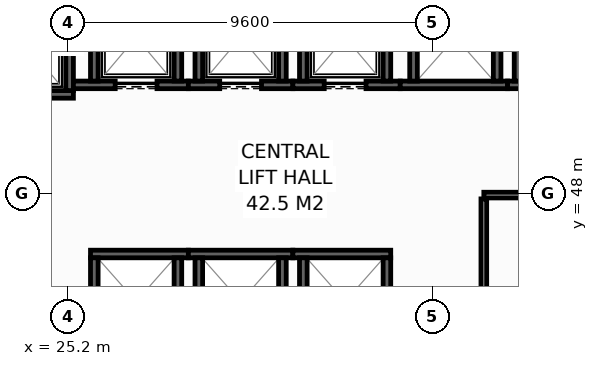
"""IFC4 building model, lengths in metres.
Left out: names, types, materials, properties, quantities, classifications, styles, units other than length and angle.
Written with IfcOpenShell. Run it as: python <this file> out.ifc"""

import sys

from ifc_helpers import new_model, si_unit, direction, frame, frame_2d, origin, place, context, subcontext, project, spatial, rectangle, extrude, element, fill, save


model = new_model("IFC4")
c1 = context("Model", 3, precision=1e-05, world=origin(), true_north=direction((0.0, 1.0)))
c2 = subcontext(c1, "Body", "Model", "MODEL_VIEW")
j1 = project(units=[si_unit("LENGTHUNIT", "METRE"), si_unit("PLANEANGLEUNIT", "RADIAN")], contexts=[c1])
p1 = place(None, origin())
s1 = spatial("IfcSite", under=j1, at=p1, CompositionType="ELEMENT")
p2 = place(p1, origin())
s2 = spatial("IfcBuilding", under=s1, at=p2, CompositionType="ELEMENT")
p3 = place(p2, frame((0.0, 0.0, 27.6)))
s3 = spatial("IfcBuildingStorey", under=s2, at=p3, CompositionType="ELEMENT", Elevation=27.6)
p4 = place(p3, frame((22.5, 50.6, 0.0), z_axis=(0.0, 0.0, 1.0), x_axis=(1.0, 0.0, 0.0)))
e1 = element("IfcWall", 1, at=p4, inside=s3, PredefinedType="SHEAR", context=c2, shape_type="SweptSolid", body=[
    extrude(rectangle(XDim=2.85, YDim=0.2, at=frame_2d((1.425, 0.0))), origin(), (0.0, 0.0, 1.0), 5.15),
])
p5 = place(p4, frame((0.925, 0.0, 0.0)))
e2 = element("IfcOpeningElement", 2, at=p5, cuts=e1, PredefinedType="OPENING", context=c2, shape_type="SweptSolid", body=[
    extrude(rectangle(XDim=1.25, YDim=2.3, at=frame_2d((0.625, 1.15))), frame((0.0, 0.11, 0.0), z_axis=(0.0, -1.0, 0.0), x_axis=(1.0, 0.0, 0.0)), (0.0, 0.0, 1.0), 0.22),
])
p6 = place(p3, frame((25.25, 50.7, 0.0), z_axis=(0.0, 0.0, 1.0), x_axis=(0.0, 1.0, 0.0)))
e3 = element("IfcWall", 3, at=p6, inside=s3, PredefinedType="SHEAR", context=c2, shape_type="SweptSolid", body=[
    extrude(rectangle(XDim=2.6, YDim=0.2, at=frame_2d((1.3, 0.0))), origin(), (0.0, 0.0, 1.0), 5.15),
])
p7 = place(p3, frame((25.35, 50.85, 0.0), z_axis=(0.0, 0.0, 1.0), x_axis=(1.0, 0.0, 0.0)))
e4 = element("IfcWall", 4, at=p7, inside=s3, PredefinedType="SHEAR", context=c2, shape_type="SweptSolid", body=[
    extrude(rectangle(XDim=3.025, YDim=0.2, at=frame_2d((1.512, 0.0))), origin(), (0.0, 0.0, 1.0), 5.15),
])
p8 = place(p7, frame((1.1, 0.0, 0.0)))
e5 = element("IfcOpeningElement", 5, at=p8, cuts=e4, PredefinedType="OPENING", context=c2, shape_type="SweptSolid", body=[
    extrude(rectangle(XDim=1.1, YDim=2.2, at=frame_2d((0.55, 1.1))), frame((0.0, 0.11, 0.0), z_axis=(0.0, -1.0, 0.0), x_axis=(1.0, 0.0, 0.0)), (0.0, 0.0, 1.0), 0.22),
])
for number, where, z_axis, x_axis in (
    (6, (25.9, 50.95, 0.0), (0.0, 0.0, 1.0), (0.0, 1.0, 0.0)),
    (7, (28.1, 50.95, 0.0), (0.0, 0.0, 1.0), (0.0, 1.0, 0.0)),
):
    element("IfcWall", number, at=place(p3, frame(where, z_axis=z_axis, x_axis=x_axis)), inside=s3, PredefinedType="SHEAR", context=c2, shape_type="SweptSolid", body=[
        extrude(rectangle(XDim=2.3, YDim=0.2, at=frame_2d((1.15, 0.0))), origin(), (0.0, 0.0, 1.0), 5.15),
    ])
p9 = place(p3, frame((28.375, 50.85, 0.0), z_axis=(0.0, 0.0, 1.0), x_axis=(1.0, 0.0, 0.0)))
e8 = element("IfcWall", 8, at=p9, inside=s3, PredefinedType="SHEAR", context=c2, shape_type="SweptSolid", body=[
    extrude(rectangle(XDim=2.75, YDim=0.2, at=frame_2d((1.375, 0.0))), origin(), (0.0, 0.0, 1.0), 5.15),
])
p10 = place(p9, frame((0.825, 0.0, 0.0)))
e9 = element("IfcOpeningElement", 9, at=p10, cuts=e8, PredefinedType="OPENING", context=c2, shape_type="SweptSolid", body=[
    extrude(rectangle(XDim=1.1, YDim=2.2, at=frame_2d((0.55, 1.1))), frame((0.0, 0.11, 0.0), z_axis=(0.0, -1.0, 0.0), x_axis=(1.0, 0.0, 0.0)), (0.0, 0.0, 1.0), 0.22),
])
for number, where, z_axis, x_axis in (
    (10, (28.65, 50.95, 0.0), (0.0, 0.0, 1.0), (0.0, 1.0, 0.0)),
    (11, (30.85, 50.95, 0.0), (0.0, 0.0, 1.0), (0.0, 1.0, 0.0)),
):
    element("IfcWall", number, at=place(p3, frame(where, z_axis=z_axis, x_axis=x_axis)), inside=s3, PredefinedType="SHEAR", context=c2, shape_type="SweptSolid", body=[
        extrude(rectangle(XDim=2.3, YDim=0.2, at=frame_2d((1.15, 0.0))), origin(), (0.0, 0.0, 1.0), 5.15),
    ])
p11 = place(p3, frame((31.125, 50.85, 0.0), z_axis=(0.0, 0.0, 1.0), x_axis=(1.0, 0.0, 0.0)))
e12 = element("IfcWall", 12, at=p11, inside=s3, PredefinedType="SHEAR", context=c2, shape_type="SweptSolid", body=[
    extrude(rectangle(XDim=2.825, YDim=0.2, at=frame_2d((1.413, 0.0))), origin(), (0.0, 0.0, 1.0), 5.15),
])
p12 = place(p11, frame((0.825, 0.0, 0.0)))
e13 = element("IfcOpeningElement", 13, at=p12, cuts=e12, PredefinedType="OPENING", context=c2, shape_type="SweptSolid", body=[
    extrude(rectangle(XDim=1.1, YDim=2.2, at=frame_2d((0.55, 1.1))), frame((0.0, 0.11, 0.0), z_axis=(0.0, -1.0, 0.0), x_axis=(1.0, 0.0, 0.0)), (0.0, 0.0, 1.0), 0.22),
])
for number, where, z_axis, x_axis in (
    (14, (31.4, 50.95, 0.0), (0.0, 0.0, 1.0), (0.0, 1.0, 0.0)),
    (15, (33.6, 50.95, 0.0), (0.0, 0.0, 1.0), (0.0, 1.0, 0.0)),
):
    element("IfcWall", number, at=place(p3, frame(where, z_axis=z_axis, x_axis=x_axis)), inside=s3, PredefinedType="SHEAR", context=c2, shape_type="SweptSolid", body=[
        extrude(rectangle(XDim=2.3, YDim=0.2, at=frame_2d((1.15, 0.0))), origin(), (0.0, 0.0, 1.0), 5.15),
    ])
p13 = place(p3, frame((25.8, 46.4, 0.0), z_axis=(0.0, 0.0, 1.0), x_axis=(1.0, 0.0, 0.0)))
e16 = element("IfcWall", 16, at=p13, inside=s3, PredefinedType="SHEAR", context=c2, shape_type="SweptSolid", body=[
    extrude(rectangle(XDim=2.575, YDim=0.2, at=frame_2d((1.288, 0.0))), origin(), (0.0, 0.0, 1.0), 5.15),
])
for number, where, z_axis, x_axis in (
    (17, (25.9, 44.0, 0.0), (0.0, 0.0, 1.0), (0.0, 1.0, 0.0)),
    (18, (28.1, 44.0, 0.0), (0.0, 0.0, 1.0), (0.0, 1.0, 0.0)),
):
    element("IfcWall", number, at=place(p3, frame(where, z_axis=z_axis, x_axis=x_axis)), inside=s3, PredefinedType="SHEAR", context=c2, shape_type="SweptSolid", body=[
        extrude(rectangle(XDim=2.3, YDim=0.2, at=frame_2d((1.15, 0.0))), origin(), (0.0, 0.0, 1.0), 5.15),
    ])
p14 = place(p3, frame((28.375, 46.4, 0.0), z_axis=(0.0, 0.0, 1.0), x_axis=(1.0, 0.0, 0.0)))
e19 = element("IfcWall", 19, at=p14, inside=s3, PredefinedType="SHEAR", context=c2, shape_type="SweptSolid", body=[
    extrude(rectangle(XDim=2.75, YDim=0.2, at=frame_2d((1.375, 0.0))), origin(), (0.0, 0.0, 1.0), 5.15),
])
for number, where, z_axis, x_axis in (
    (20, (28.65, 44.0, 0.0), (0.0, 0.0, 1.0), (0.0, 1.0, 0.0)),
    (21, (30.85, 44.0, 0.0), (0.0, 0.0, 1.0), (0.0, 1.0, 0.0)),
):
    element("IfcWall", number, at=place(p3, frame(where, z_axis=z_axis, x_axis=x_axis)), inside=s3, PredefinedType="SHEAR", context=c2, shape_type="SweptSolid", body=[
        extrude(rectangle(XDim=2.3, YDim=0.2, at=frame_2d((1.15, 0.0))), origin(), (0.0, 0.0, 1.0), 5.15),
    ])
p15 = place(p3, frame((31.125, 46.4, 0.0), z_axis=(0.0, 0.0, 1.0), x_axis=(1.0, 0.0, 0.0)))
e22 = element("IfcWall", 22, at=p15, inside=s3, PredefinedType="SHEAR", context=c2, shape_type="SweptSolid", body=[
    extrude(rectangle(XDim=2.575, YDim=0.2, at=frame_2d((1.288, 0.0))), origin(), (0.0, 0.0, 1.0), 5.15),
])
for number, where, z_axis, x_axis in (
    (23, (31.4, 44.0, 0.0), (0.0, 0.0, 1.0), (0.0, 1.0, 0.0)),
    (24, (33.6, 44.0, 0.0), (0.0, 0.0, 1.0), (0.0, 1.0, 0.0)),
):
    element("IfcWall", number, at=place(p3, frame(where, z_axis=z_axis, x_axis=x_axis)), inside=s3, PredefinedType="SHEAR", context=c2, shape_type="SweptSolid", body=[
        extrude(rectangle(XDim=2.3, YDim=0.2, at=frame_2d((1.15, 0.0))), origin(), (0.0, 0.0, 1.0), 5.15),
    ])
p16 = place(p3, frame((33.95, 50.85, 0.0), z_axis=(0.0, 0.0, 1.0), x_axis=(1.0, 0.0, 0.0)))
e25 = element("IfcWall", 25, at=p16, inside=s3, PredefinedType="SHEAR", context=c2, shape_type="SweptSolid", body=[
    extrude(rectangle(XDim=2.825, YDim=0.2, at=frame_2d((1.413, 0.0))), origin(), (0.0, 0.0, 1.0), 5.15),
])
for number, where, z_axis, x_axis in (
    (26, (34.3, 50.95, 0.0), (0.0, 0.0, 1.0), (0.0, 1.0, 0.0)),
    (27, (36.5, 50.95, 0.0), (0.0, 0.0, 1.0), (0.0, 1.0, 0.0)),
):
    element("IfcWall", number, at=place(p3, frame(where, z_axis=z_axis, x_axis=x_axis)), inside=s3, PredefinedType="SHEAR", context=c2, shape_type="SweptSolid", body=[
        extrude(rectangle(XDim=2.3, YDim=0.2, at=frame_2d((1.15, 0.0))), origin(), (0.0, 0.0, 1.0), 5.15),
    ])
p17 = place(p3, frame((36.775, 50.85, 0.0), z_axis=(0.0, 0.0, 1.0), x_axis=(1.0, 0.0, 0.0)))
e28 = element("IfcWall", 28, at=p17, inside=s3, PredefinedType="SHEAR", context=c2, shape_type="SweptSolid", body=[
    extrude(rectangle(XDim=2.75, YDim=0.2, at=frame_2d((1.375, 0.0))), origin(), (0.0, 0.0, 1.0), 5.15),
])
p18 = place(p3, frame((37.05, 50.95, 0.0), z_axis=(0.0, 0.0, 1.0), x_axis=(0.0, 1.0, 0.0)))
e29 = element("IfcWall", 29, at=p18, inside=s3, PredefinedType="SHEAR", context=c2, shape_type="SweptSolid", body=[
    extrude(rectangle(XDim=2.3, YDim=0.2, at=frame_2d((1.15, 0.0))), origin(), (0.0, 0.0, 1.0), 5.15),
])
p19 = place(p3, frame((36.15, 47.95, 0.0), z_axis=(0.0, 0.0, 1.0), x_axis=(1.0, 0.0, 0.0)))
e30 = element("IfcWall", 30, at=p19, inside=s3, PredefinedType="PARTITIONING", context=c2, shape_type="SweptSolid", body=[
    extrude(rectangle(XDim=6.35, YDim=0.15, at=frame_2d((3.175, 0.0))), origin(), (0.0, 0.0, 1.0), 5.15),
])
p20 = place(p3, frame((36.15, 45.22, 0.0), z_axis=(0.0, 0.0, 1.0), x_axis=(0.0, 1.0, 0.0)))
e31 = element("IfcWall", 31, at=p20, inside=s3, PredefinedType="PARTITIONING", context=c2, shape_type="SweptSolid", body=[
    extrude(rectangle(XDim=2.63, YDim=0.15, at=frame_2d((1.315, 0.0))), origin(), (0.0, 0.0, 1.0), 5.15),
])
p21 = place(p8, origin())
e32 = element("IfcDoor", 32, at=p21, inside=s3, OperationType="SLIDING_TO_LEFT", PredefinedType="DOOR", context=c2, shape_type="SweptSolid", body=[
    extrude(rectangle(XDim=1.1, YDim=2.2, at=frame_2d((0.55, 1.1))), frame((0.0, 0.025, 0.0), z_axis=(0.0, -1.0, 0.0), x_axis=(1.0, 0.0, 0.0)), (0.0, 0.0, 1.0), 0.05),
])
fill(e5, e32)
p22 = place(p10, origin())
e33 = element("IfcDoor", 33, at=p22, inside=s3, OperationType="SLIDING_TO_LEFT", PredefinedType="DOOR", context=c2, shape_type="SweptSolid", body=[
    extrude(rectangle(XDim=1.1, YDim=2.2, at=frame_2d((0.55, 1.1))), frame((0.0, 0.025, 0.0), z_axis=(0.0, -1.0, 0.0), x_axis=(1.0, 0.0, 0.0)), (0.0, 0.0, 1.0), 0.05),
])
fill(e9, e33)
p23 = place(p12, origin())
e34 = element("IfcDoor", 34, at=p23, inside=s3, OperationType="SLIDING_TO_LEFT", PredefinedType="DOOR", context=c2, shape_type="SweptSolid", body=[
    extrude(rectangle(XDim=1.1, YDim=2.2, at=frame_2d((0.55, 1.1))), frame((0.0, 0.025, 0.0), z_axis=(0.0, -1.0, 0.0), x_axis=(1.0, 0.0, 0.0)), (0.0, 0.0, 1.0), 0.05),
])
fill(e13, e34)
save(model, sys.argv[1])
